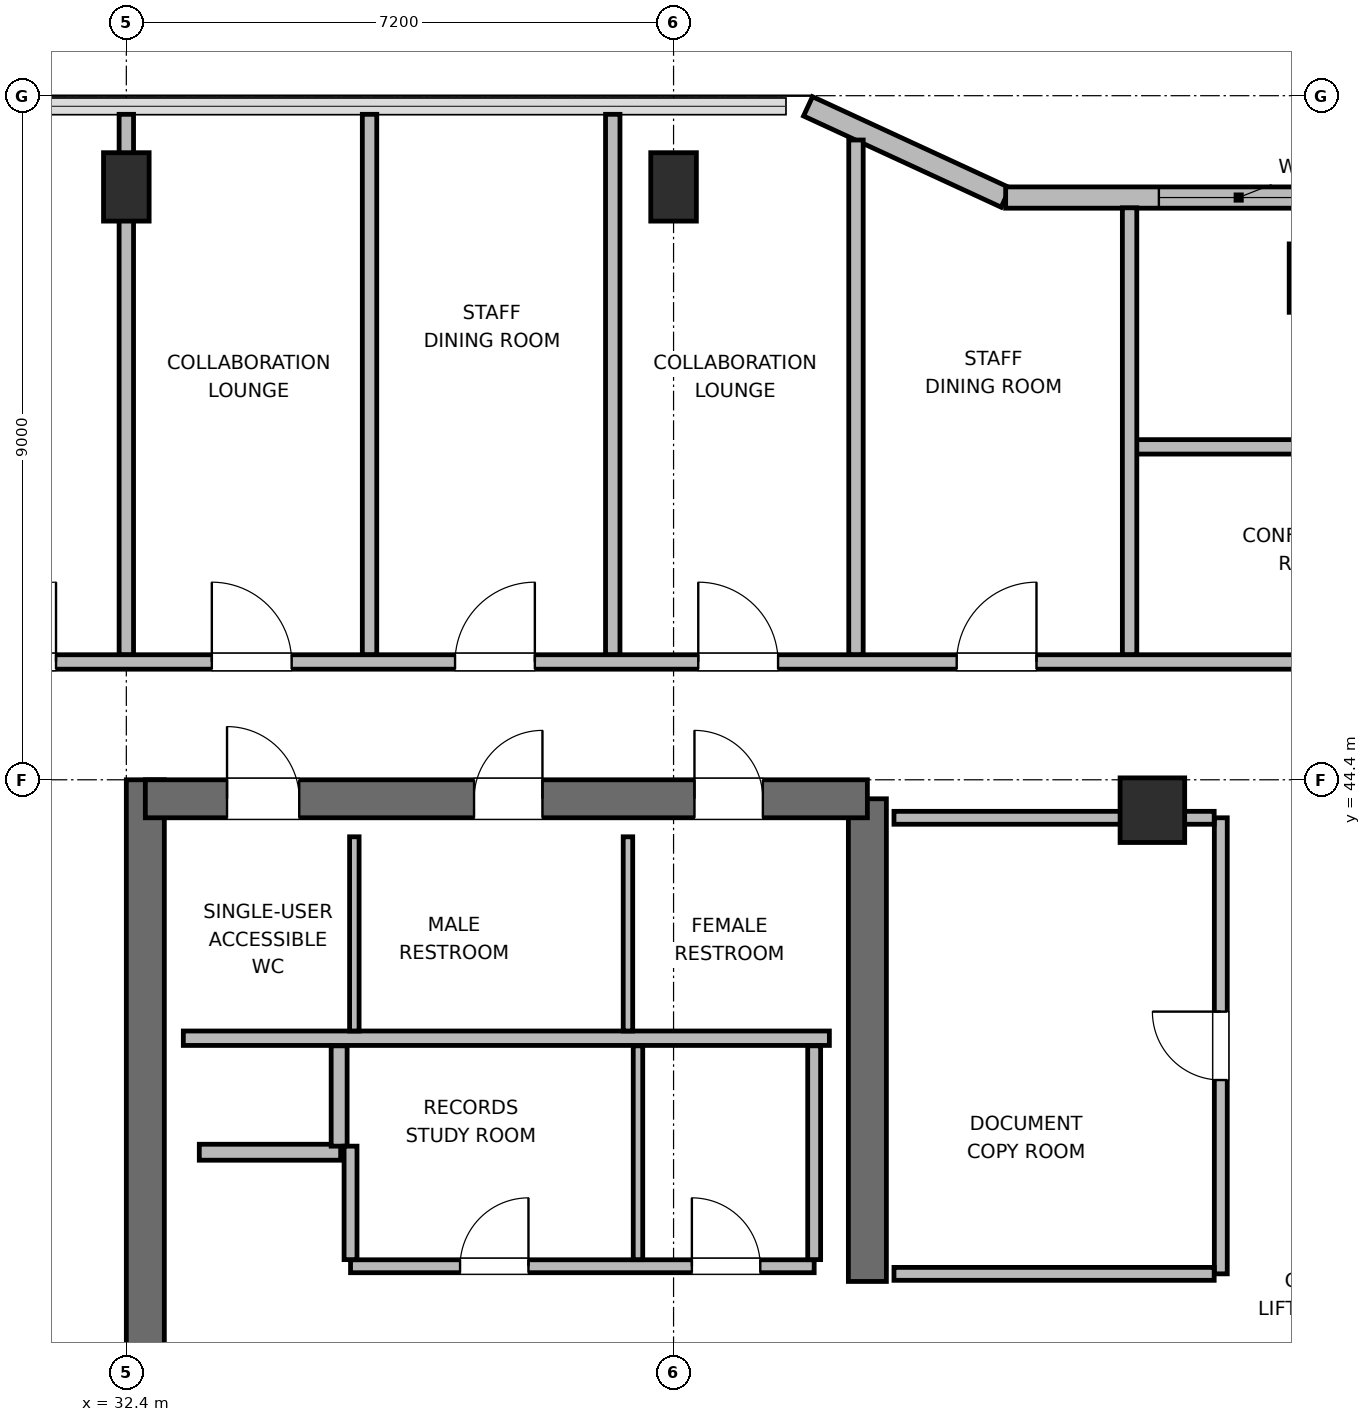
"""IFC4 building model, lengths in metres.
Left out: names, types, materials, properties, quantities, classifications, styles, units other than length and angle.
Written with IfcOpenShell. Run it as: python <this file> out.ifc"""

import sys

from ifc_helpers import new_model, si_unit, direction, frame, frame_2d, origin, origin_2d, place, context, subcontext, project, spatial, rectangle, extrude, element, fill, save


model = new_model("IFC4")
c1 = context("Model", 3, precision=1e-05, world=origin(), true_north=direction((0.0, 1.0)))
c2 = subcontext(c1, "Body", "Model", "MODEL_VIEW")
j1 = project(units=[si_unit("LENGTHUNIT", "METRE"), si_unit("PLANEANGLEUNIT", "RADIAN")], contexts=[c1])
p1 = place(None, origin())
s1 = spatial("IfcSite", under=j1, at=p1, CompositionType="ELEMENT")
p2 = place(p1, origin())
s2 = spatial("IfcBuilding", under=s1, at=p2, CompositionType="ELEMENT")
p3 = place(p2, frame((0.0, 0.0, 346.5)))
s3 = spatial("IfcBuildingStorey", under=s2, at=p3, CompositionType="ELEMENT", Elevation=346.5)
p4 = place(p3, frame((32.65, 27.6, 0.0), z_axis=(0.0, 0.0, 1.0), x_axis=(0.0, 1.0, 0.0)))
e1 = element("IfcWall", 1, at=p4, inside=s3, PredefinedType="SHEAR", context=c2, shape_type="SweptSolid", body=[
    extrude(rectangle(XDim=16.8, YDim=0.5, at=frame_2d((8.4, 0.0))), origin(), (0.0, 0.0, 1.0), 3.9),
])
p5 = place(p3, frame((42.15, 37.8, 0.0), z_axis=(0.0, 0.0, 1.0), x_axis=(0.0, 1.0, 0.0)))
e2 = element("IfcWall", 2, at=p5, inside=s3, PredefinedType="SHEAR", context=c2, shape_type="SweptSolid", body=[
    extrude(rectangle(XDim=6.35, YDim=0.5, at=frame_2d((3.175, 0.0))), origin(), (0.0, 0.0, 1.0), 3.9),
])
p6 = place(p3, frame((32.65, 44.15, 0.0), z_axis=(0.0, 0.0, 1.0), x_axis=(1.0, 0.0, 0.0)))
e3 = element("IfcWall", 3, at=p6, inside=s3, PredefinedType="SHEAR", context=c2, shape_type="SweptSolid", body=[
    extrude(rectangle(XDim=9.5, YDim=0.5, at=frame_2d((4.75, 0.0))), origin(), (0.0, 0.0, 1.0), 3.9),
])
p7 = place(p6, frame((1.075, 0.0, 0.0)))
e4 = element("IfcOpeningElement", 4, at=p7, cuts=e3, PredefinedType="OPENING", context=c2, shape_type="SweptSolid", body=[
    extrude(rectangle(XDim=0.95, YDim=2.04, at=frame_2d((0.475, 1.02))), frame((0.0, 0.26, 0.0), z_axis=(0.0, -1.0, 0.0), x_axis=(1.0, 0.0, 0.0)), (0.0, 0.0, 1.0), 0.52),
])
p8 = place(p6, frame((4.325, 0.0, 0.0)))
e5 = element("IfcOpeningElement", 5, at=p8, cuts=e3, PredefinedType="OPENING", context=c2, shape_type="SweptSolid", body=[
    extrude(rectangle(XDim=0.9, YDim=2.02, at=frame_2d((0.45, 1.01))), frame((0.0, 0.26, 0.0), z_axis=(0.0, -1.0, 0.0), x_axis=(1.0, 0.0, 0.0)), (0.0, 0.0, 1.0), 0.52),
])
p9 = place(p6, frame((7.225, 0.0, 0.0)))
e6 = element("IfcOpeningElement", 6, at=p9, cuts=e3, PredefinedType="OPENING", context=c2, shape_type="SweptSolid", body=[
    extrude(rectangle(XDim=0.9, YDim=2.02, at=frame_2d((0.45, 1.01))), frame((0.0, 0.26, 0.0), z_axis=(0.0, -1.0, 0.0), x_axis=(1.0, 0.0, 0.0)), (0.0, 0.0, 1.0), 0.52),
])
for number, where, z_axis, x_axis in (
    (7, (32.4, 52.2, 0.0), (0.0, 0.0, 1.0), (1.0, 0.0, 0.0)),
    (8, (39.6, 52.2, 0.0), (0.0, 0.0, 1.0), (1.0, 0.0, 0.0)),
    (9, (48.0, 51.0, 0.0), (0.0, 0.0, 1.0), (1.0, 0.0, 0.0)),
):
    element("IfcColumn", number, at=place(p3, frame(where, z_axis=z_axis, x_axis=x_axis)), inside=s3, PredefinedType="COLUMN", context=c2, shape_type="SweptSolid", body=[
        extrude(rectangle(XDim=0.6, YDim=0.9, at=origin_2d()), origin(), (0.0, 0.0, 1.0), 3.9),
    ])
p10 = place(p3, frame((45.9, 44.0, 0.0), z_axis=(0.0, 0.0, 1.0), x_axis=(1.0, 0.0, 0.0)))
e10 = element("IfcColumn", 10, at=p10, inside=s3, PredefinedType="COLUMN", context=c2, shape_type="SweptSolid", body=[
    extrude(rectangle(XDim=0.85, YDim=0.85, at=origin_2d()), origin(), (0.0, 0.0, 1.0), 3.9),
])
p11 = place(p3, frame((41.369, 53.26, 0.0), z_axis=(0.0, 0.0, 1.0), x_axis=(0.907956889006, -0.419063584324, 0.0)))
e11 = element("IfcWall", 11, at=p11, inside=s3, PredefinedType="SOLIDWALL", context=c2, shape_type="SweptSolid", body=[
    extrude(rectangle(XDim=2.864, YDim=0.28, at=frame_2d((1.432, 0.0))), origin(), (0.0, 0.0, 1.0), 2.215),
])
p12 = place(p3, frame((43.969, 52.06, 0.0), z_axis=(0.0, 0.0, 1.0), x_axis=(1.0, 0.0, 0.0)))
e12 = element("IfcWall", 12, at=p12, inside=s3, PredefinedType="SOLIDWALL", context=c2, shape_type="SweptSolid", body=[
    extrude(rectangle(XDim=4.691, YDim=0.28, at=frame_2d((2.345, 0.0))), origin(), (0.0, 0.0, 1.0), 2.215),
])
p13 = place(p12, frame((2.016, 0.0, 0.85)))
e13 = element("IfcOpeningElement", 13, at=p13, cuts=e12, PredefinedType="OPENING", context=c2, shape_type="SweptSolid", body=[
    extrude(rectangle(XDim=2.1, YDim=1.05, at=frame_2d((1.05, 0.525))), frame((0.0, 0.15, 0.0), z_axis=(0.0, -1.0, 0.0), x_axis=(1.0, 0.0, 0.0)), (0.0, 0.0, 1.0), 0.3),
])
p14 = place(p3, frame((33.15, 41.0, 0.0), z_axis=(0.0, 0.0, 1.0), x_axis=(1.0, 0.0, 0.0)))
e14 = element("IfcWall", 14, at=p14, inside=s3, PredefinedType="PLUMBINGWALL", context=c2, shape_type="SweptSolid", body=[
    extrude(rectangle(XDim=8.5, YDim=0.19, at=frame_2d((4.25, 0.0))), origin(), (0.0, 0.0, 1.0), 3.68),
])
for number, where, z_axis, x_axis in (
    (15, (35.4, 41.095, 0.0), (0.0, 0.0, 1.0), (0.0, 1.0, 0.0)),
    (16, (39.0, 41.095, 0.0), (0.0, 0.0, 1.0), (0.0, 1.0, 0.0)),
):
    element("IfcWall", number, at=place(p3, frame(where, z_axis=z_axis, x_axis=x_axis)), inside=s3, PredefinedType="PARTITIONING", context=c2, shape_type="SweptSolid", body=[
        extrude(rectangle(XDim=2.555, YDim=0.125, at=frame_2d((1.277, 0.0))), origin(), (0.0, 0.0, 1.0), 3.68),
    ])
p15 = place(p3, frame((33.36, 39.5, 0.0), z_axis=(0.0, 0.0, 1.0), x_axis=(1.0, 0.0, 0.0)))
e17 = element("IfcWall", 17, at=p15, inside=s3, PredefinedType="PARTITIONING", context=c2, shape_type="SweptSolid", body=[
    extrude(rectangle(XDim=1.86, YDim=0.21, at=frame_2d((0.93, 0.0))), origin(), (0.0, 0.0, 1.0), 3.68),
])
p16 = place(p3, frame((35.2, 39.58, 0.0), z_axis=(0.0, 0.0, 1.0), x_axis=(0.0, 1.0, 0.0)))
e18 = element("IfcWall", 18, at=p16, inside=s3, PredefinedType="PARTITIONING", context=c2, shape_type="SweptSolid", body=[
    extrude(rectangle(XDim=1.32, YDim=0.21, at=frame_2d((0.66, 0.0))), origin(), (0.0, 0.0, 1.0), 3.68),
])
p17 = place(p3, frame((35.35, 38.0, 0.0), z_axis=(0.0, 0.0, 1.0), x_axis=(1.0, 0.0, 0.0)))
e19 = element("IfcWall", 19, at=p17, inside=s3, PredefinedType="PARTITIONING", context=c2, shape_type="SweptSolid", body=[
    extrude(rectangle(XDim=6.1, YDim=0.17, at=frame_2d((3.05, 0.0))), origin(), (0.0, 0.0, 1.0), 3.68),
])
p18 = place(p17, frame((1.441, 0.0, 0.0)))
e20 = element("IfcOpeningElement", 20, at=p18, cuts=e19, PredefinedType="OPENING", context=c2, shape_type="SweptSolid", body=[
    extrude(rectangle(XDim=0.9, YDim=2.02, at=frame_2d((0.45, 1.01))), frame((0.0, 0.095, 0.0), z_axis=(0.0, -1.0, 0.0), x_axis=(1.0, 0.0, 0.0)), (0.0, 0.0, 1.0), 0.19),
])
p19 = place(p17, frame((4.491, 0.0, 0.0)))
e21 = element("IfcOpeningElement", 21, at=p19, cuts=e19, PredefinedType="OPENING", context=c2, shape_type="SweptSolid", body=[
    extrude(rectangle(XDim=0.9, YDim=2.02, at=frame_2d((0.45, 1.01))), frame((0.0, 0.095, 0.0), z_axis=(0.0, -1.0, 0.0), x_axis=(1.0, 0.0, 0.0)), (0.0, 0.0, 1.0), 0.19),
])
p20 = place(p3, frame((35.35, 38.087, 0.0), z_axis=(0.0, 0.0, 1.0), x_axis=(0.0, 1.0, 0.0)))
e22 = element("IfcWall", 22, at=p20, inside=s3, PredefinedType="PARTITIONING", context=c2, shape_type="SweptSolid", body=[
    extrude(rectangle(XDim=1.493, YDim=0.17, at=frame_2d((0.747, 0.0))), origin(), (0.0, 0.0, 1.0), 3.68),
])
p21 = place(p3, frame((41.45, 38.087, 0.0), z_axis=(0.0, 0.0, 1.0), x_axis=(0.0, 1.0, 0.0)))
e23 = element("IfcWall", 23, at=p21, inside=s3, PredefinedType="PARTITIONING", context=c2, shape_type="SweptSolid", body=[
    extrude(rectangle(XDim=2.813, YDim=0.17, at=frame_2d((1.406, 0.0))), origin(), (0.0, 0.0, 1.0), 3.68),
])
p22 = place(p3, frame((39.132, 38.087, 0.0), z_axis=(0.0, 0.0, 1.0), x_axis=(0.0, 1.0, 0.0)))
e24 = element("IfcWall", 24, at=p22, inside=s3, PredefinedType="PARTITIONING", context=c2, shape_type="SweptSolid", body=[
    extrude(rectangle(XDim=2.813, YDim=0.125, at=frame_2d((1.406, 0.0))), origin(), (0.0, 0.0, 1.0), 3.68),
])
p23 = place(p3, frame((46.8, 37.9, 0.0), z_axis=(0.0, 0.0, 1.0), x_axis=(0.0, 1.0, 0.0)))
e25 = element("IfcWall", 25, at=p23, inside=s3, PredefinedType="PARTITIONING", context=c2, shape_type="SweptSolid", body=[
    extrude(rectangle(XDim=6.0, YDim=0.17, at=frame_2d((3.0, 0.0))), origin(), (0.0, 0.0, 1.0), 3.68),
])
p24 = place(p23, frame((2.55, 0.0, 0.0)))
e26 = element("IfcOpeningElement", 26, at=p24, cuts=e25, PredefinedType="OPENING", context=c2, shape_type="SweptSolid", body=[
    extrude(rectangle(XDim=0.9, YDim=2.02, at=frame_2d((0.45, 1.01))), frame((0.0, 0.095, 0.0), z_axis=(0.0, -1.0, 0.0), x_axis=(1.0, 0.0, 0.0)), (0.0, 0.0, 1.0), 0.19),
])
p25 = place(p3, frame((42.5, 37.9, 0.0), z_axis=(0.0, 0.0, 1.0), x_axis=(1.0, 0.0, 0.0)))
e27 = element("IfcWall", 27, at=p25, inside=s3, PredefinedType="PARTITIONING", context=c2, shape_type="SweptSolid", body=[
    extrude(rectangle(XDim=4.213, YDim=0.17, at=frame_2d((2.106, 0.0))), origin(), (0.0, 0.0, 1.0), 3.68),
])
p26 = place(p3, frame((42.5, 43.9, 0.0), z_axis=(0.0, 0.0, 1.0), x_axis=(1.0, 0.0, 0.0)))
e28 = element("IfcWall", 28, at=p26, inside=s3, PredefinedType="PARTITIONING", context=c2, shape_type="SweptSolid", body=[
    extrude(rectangle(XDim=4.213, YDim=0.17, at=frame_2d((2.106, 0.0))), origin(), (0.0, 0.0, 1.0), 2.765),
])
p27 = place(p3, frame((29.4, 45.95, 0.0), z_axis=(0.0, 0.0, 1.0), x_axis=(1.0, 0.0, 0.0)))
e29 = element("IfcWall", 29, at=p27, inside=s3, PredefinedType="PLUMBINGWALL", context=c2, shape_type="SweptSolid", body=[
    extrude(rectangle(XDim=37.4, YDim=0.19, at=frame_2d((18.7, 0.0))), origin(), (0.0, 0.0, 1.0), 3.68),
])
p28 = place(p27, frame((1.025, 0.0, 0.0)))
e30 = element("IfcOpeningElement", 30, at=p28, cuts=e29, PredefinedType="OPENING", context=c2, shape_type="SweptSolid", body=[
    extrude(rectangle(XDim=1.05, YDim=2.04, at=frame_2d((0.525, 1.02))), frame((0.0, 0.105, 0.0), z_axis=(0.0, -1.0, 0.0), x_axis=(1.0, 0.0, 0.0)), (0.0, 0.0, 1.0), 0.21),
])
p29 = place(p27, frame((4.125, 0.0, 0.0)))
e31 = element("IfcOpeningElement", 31, at=p29, cuts=e29, PredefinedType="OPENING", context=c2, shape_type="SweptSolid", body=[
    extrude(rectangle(XDim=1.05, YDim=2.04, at=frame_2d((0.525, 1.02))), frame((0.0, 0.105, 0.0), z_axis=(0.0, -1.0, 0.0), x_axis=(1.0, 0.0, 0.0)), (0.0, 0.0, 1.0), 0.21),
])
p30 = place(p27, frame((7.325, 0.0, 0.0)))
e32 = element("IfcOpeningElement", 32, at=p30, cuts=e29, PredefinedType="OPENING", context=c2, shape_type="SweptSolid", body=[
    extrude(rectangle(XDim=1.05, YDim=2.04, at=frame_2d((0.525, 1.02))), frame((0.0, 0.105, 0.0), z_axis=(0.0, -1.0, 0.0), x_axis=(1.0, 0.0, 0.0)), (0.0, 0.0, 1.0), 0.21),
])
p31 = place(p27, frame((10.525, 0.0, 0.0)))
e33 = element("IfcOpeningElement", 33, at=p31, cuts=e29, PredefinedType="OPENING", context=c2, shape_type="SweptSolid", body=[
    extrude(rectangle(XDim=1.05, YDim=2.04, at=frame_2d((0.525, 1.02))), frame((0.0, 0.105, 0.0), z_axis=(0.0, -1.0, 0.0), x_axis=(1.0, 0.0, 0.0)), (0.0, 0.0, 1.0), 0.21),
])
p32 = place(p27, frame((13.925, 0.0, 0.0)))
e34 = element("IfcOpeningElement", 34, at=p32, cuts=e29, PredefinedType="OPENING", context=c2, shape_type="SweptSolid", body=[
    extrude(rectangle(XDim=1.05, YDim=2.04, at=frame_2d((0.525, 1.02))), frame((0.0, 0.105, 0.0), z_axis=(0.0, -1.0, 0.0), x_axis=(1.0, 0.0, 0.0)), (0.0, 0.0, 1.0), 0.21),
])
p33 = place(p27, frame((20.125, 0.0, 0.0)))
e35 = element("IfcOpeningElement", 35, at=p33, cuts=e29, PredefinedType="OPENING", context=c2, shape_type="SweptSolid", body=[
    extrude(rectangle(XDim=1.05, YDim=2.04, at=frame_2d((0.525, 1.02))), frame((0.0, 0.105, 0.0), z_axis=(0.0, -1.0, 0.0), x_axis=(1.0, 0.0, 0.0)), (0.0, 0.0, 1.0), 0.21),
])
p34 = place(p27, frame((26.125, 0.0, 0.0)))
e36 = element("IfcOpeningElement", 36, at=p34, cuts=e29, PredefinedType="OPENING", context=c2, shape_type="SweptSolid", body=[
    extrude(rectangle(XDim=1.05, YDim=2.04, at=frame_2d((0.525, 1.02))), frame((0.0, 0.105, 0.0), z_axis=(0.0, -1.0, 0.0), x_axis=(1.0, 0.0, 0.0)), (0.0, 0.0, 1.0), 0.21),
])
p35 = place(p27, frame((29.325, 0.0, 0.0)))
e37 = element("IfcOpeningElement", 37, at=p35, cuts=e29, PredefinedType="OPENING", context=c2, shape_type="SweptSolid", body=[
    extrude(rectangle(XDim=1.05, YDim=2.04, at=frame_2d((0.525, 1.02))), frame((0.0, 0.105, 0.0), z_axis=(0.0, -1.0, 0.0), x_axis=(1.0, 0.0, 0.0)), (0.0, 0.0, 1.0), 0.21),
])
p36 = place(p27, frame((33.925, 0.0, 0.0)))
e38 = element("IfcOpeningElement", 38, at=p36, cuts=e29, PredefinedType="OPENING", context=c2, shape_type="SweptSolid", body=[
    extrude(rectangle(XDim=1.05, YDim=2.04, at=frame_2d((0.525, 1.02))), frame((0.0, 0.105, 0.0), z_axis=(0.0, -1.0, 0.0), x_axis=(1.0, 0.0, 0.0)), (0.0, 0.0, 1.0), 0.21),
])
p37 = place(p3, frame((32.4, 46.047, 0.0), z_axis=(0.0, 0.0, 1.0), x_axis=(0.0, 1.0, 0.0)))
e39 = element("IfcWall", 39, at=p37, inside=s3, PredefinedType="PLUMBINGWALL", context=c2, shape_type="SweptSolid", body=[
    extrude(rectangle(XDim=7.108, YDim=0.19, at=frame_2d((3.554, 0.0))), origin(), (0.0, 0.0, 1.0), 3.054),
])
for number, where, z_axis, x_axis in (
    (40, (35.6, 46.047, 0.0), (0.0, 0.0, 1.0), (0.0, 1.0, 0.0)),
    (41, (38.8, 46.047, 0.0), (0.0, 0.0, 1.0), (0.0, 1.0, 0.0)),
):
    element("IfcWall", number, at=place(p3, frame(where, z_axis=z_axis, x_axis=x_axis)), inside=s3, PredefinedType="PLUMBINGWALL", context=c2, shape_type="SweptSolid", body=[
        extrude(rectangle(XDim=7.108, YDim=0.19, at=frame_2d((3.554, 0.0))), origin(), (0.0, 0.0, 1.0), 3.68),
    ])
p38 = place(p3, frame((42.0, 46.047, 0.0), z_axis=(0.0, 0.0, 1.0), x_axis=(0.0, 1.0, 0.0)))
e42 = element("IfcWall", 42, at=p38, inside=s3, PredefinedType="PLUMBINGWALL", context=c2, shape_type="SweptSolid", body=[
    extrude(rectangle(XDim=6.77, YDim=0.19, at=frame_2d((3.385, 0.0))), origin(), (0.0, 0.0, 1.0), 3.043),
])
p39 = place(p3, frame((45.6, 48.78, 0.0), z_axis=(0.0, 0.0, 1.0), x_axis=(1.0, 0.0, 0.0)))
e43 = element("IfcWall", 43, at=p39, inside=s3, PredefinedType="PLUMBINGWALL", context=c2, shape_type="SweptSolid", body=[
    extrude(rectangle(XDim=8.8, YDim=0.19, at=frame_2d((4.4, 0.0))), origin(), (0.0, 0.0, 1.0), 3.311),
])
p40 = place(p39, frame((3.95, 0.0, 0.0)))
e44 = element("IfcOpeningElement", 44, at=p40, cuts=e43, PredefinedType="OPENING", context=c2, shape_type="SweptSolid", body=[
    extrude(rectangle(XDim=0.9, YDim=2.02, at=frame_2d((0.45, 1.01))), frame((0.0, 0.105, 0.0), z_axis=(0.0, -1.0, 0.0), x_axis=(1.0, 0.0, 0.0)), (0.0, 0.0, 1.0), 0.21),
])
p41 = place(p3, frame((45.6, 46.047, 0.0), z_axis=(0.0, 0.0, 1.0), x_axis=(0.0, 1.0, 0.0)))
e45 = element("IfcWall", 45, at=p41, inside=s3, PredefinedType="PLUMBINGWALL", context=c2, shape_type="SweptSolid", body=[
    extrude(rectangle(XDim=5.878, YDim=0.19, at=frame_2d((2.939, 0.0))), origin(), (0.0, 0.0, 1.0), 3.68),
])
p42 = place(p13, origin())
e46 = element("IfcWindow", 46, at=p42, inside=s3, PartitioningType="SINGLE_PANEL", PredefinedType="WINDOW", context=c2, shape_type="SweptSolid", body=[
    extrude(rectangle(XDim=2.1, YDim=1.05, at=frame_2d((1.05, 0.525))), frame((0.0, 0.03, 0.0), z_axis=(0.0, -1.0, 0.0), x_axis=(1.0, 0.0, 0.0)), (0.0, 0.0, 1.0), 0.06),
])
fill(e13, e46)
p43 = place(p7, origin())
e47 = element("IfcDoor", 47, at=p43, inside=s3, OperationType="SINGLE_SWING_LEFT", PredefinedType="DOOR", context=c2, shape_type="SweptSolid", body=[
    extrude(rectangle(XDim=0.95, YDim=2.04, at=frame_2d((0.475, 1.02))), frame((0.0, 0.025, 0.0), z_axis=(0.0, -1.0, 0.0), x_axis=(1.0, 0.0, 0.0)), (0.0, 0.0, 1.0), 0.05),
])
fill(e4, e47)
p44 = place(p8, origin())
e48 = element("IfcDoor", 48, at=p44, inside=s3, OperationType="SINGLE_SWING_RIGHT", PredefinedType="DOOR", context=c2, shape_type="SweptSolid", body=[
    extrude(rectangle(XDim=0.9, YDim=2.02, at=frame_2d((0.45, 1.01))), frame((0.0, 0.025, 0.0), z_axis=(0.0, -1.0, 0.0), x_axis=(1.0, 0.0, 0.0)), (0.0, 0.0, 1.0), 0.05),
])
fill(e5, e48)
p45 = place(p9, origin())
e49 = element("IfcDoor", 49, at=p45, inside=s3, OperationType="SINGLE_SWING_LEFT", PredefinedType="DOOR", context=c2, shape_type="SweptSolid", body=[
    extrude(rectangle(XDim=0.9, YDim=2.02, at=frame_2d((0.45, 1.01))), frame((0.0, 0.025, 0.0), z_axis=(0.0, -1.0, 0.0), x_axis=(1.0, 0.0, 0.0)), (0.0, 0.0, 1.0), 0.05),
])
fill(e6, e49)
p46 = place(p18, origin())
e50 = element("IfcDoor", 50, at=p46, inside=s3, OperationType="SINGLE_SWING_RIGHT", PredefinedType="DOOR", context=c2, shape_type="SweptSolid", body=[
    extrude(rectangle(XDim=0.9, YDim=2.02, at=frame_2d((0.45, 1.01))), frame((0.0, 0.025, 0.0), z_axis=(0.0, -1.0, 0.0), x_axis=(1.0, 0.0, 0.0)), (0.0, 0.0, 1.0), 0.05),
])
fill(e20, e50)
p47 = place(p19, origin())
e51 = element("IfcDoor", 51, at=p47, inside=s3, OperationType="SINGLE_SWING_LEFT", PredefinedType="DOOR", context=c2, shape_type="SweptSolid", body=[
    extrude(rectangle(XDim=0.9, YDim=2.02, at=frame_2d((0.45, 1.01))), frame((0.0, 0.025, 0.0), z_axis=(0.0, -1.0, 0.0), x_axis=(1.0, 0.0, 0.0)), (0.0, 0.0, 1.0), 0.05),
])
fill(e21, e51)
p48 = place(p24, origin())
e52 = element("IfcDoor", 52, at=p48, inside=s3, OperationType="SINGLE_SWING_RIGHT", PredefinedType="DOOR", context=c2, shape_type="SweptSolid", body=[
    extrude(rectangle(XDim=0.9, YDim=2.02, at=frame_2d((0.45, 1.01))), frame((0.0, 0.025, 0.0), z_axis=(0.0, -1.0, 0.0), x_axis=(1.0, 0.0, 0.0)), (0.0, 0.0, 1.0), 0.05),
])
fill(e26, e52)
p49 = place(p28, origin())
e53 = element("IfcDoor", 53, at=p49, inside=s3, OperationType="SINGLE_SWING_RIGHT", PredefinedType="DOOR", context=c2, shape_type="SweptSolid", body=[
    extrude(rectangle(XDim=1.05, YDim=2.04, at=frame_2d((0.525, 1.02))), frame((0.0, 0.025, 0.0), z_axis=(0.0, -1.0, 0.0), x_axis=(1.0, 0.0, 0.0)), (0.0, 0.0, 1.0), 0.05),
])
fill(e30, e53)
p50 = place(p29, origin())
e54 = element("IfcDoor", 54, at=p50, inside=s3, OperationType="SINGLE_SWING_LEFT", PredefinedType="DOOR", context=c2, shape_type="SweptSolid", body=[
    extrude(rectangle(XDim=1.05, YDim=2.04, at=frame_2d((0.525, 1.02))), frame((0.0, 0.025, 0.0), z_axis=(0.0, -1.0, 0.0), x_axis=(1.0, 0.0, 0.0)), (0.0, 0.0, 1.0), 0.05),
])
fill(e31, e54)
p51 = place(p30, origin())
e55 = element("IfcDoor", 55, at=p51, inside=s3, OperationType="SINGLE_SWING_RIGHT", PredefinedType="DOOR", context=c2, shape_type="SweptSolid", body=[
    extrude(rectangle(XDim=1.05, YDim=2.04, at=frame_2d((0.525, 1.02))), frame((0.0, 0.025, 0.0), z_axis=(0.0, -1.0, 0.0), x_axis=(1.0, 0.0, 0.0)), (0.0, 0.0, 1.0), 0.05),
])
fill(e32, e55)
p52 = place(p31, origin())
e56 = element("IfcDoor", 56, at=p52, inside=s3, OperationType="SINGLE_SWING_LEFT", PredefinedType="DOOR", context=c2, shape_type="SweptSolid", body=[
    extrude(rectangle(XDim=1.05, YDim=2.04, at=frame_2d((0.525, 1.02))), frame((0.0, 0.025, 0.0), z_axis=(0.0, -1.0, 0.0), x_axis=(1.0, 0.0, 0.0)), (0.0, 0.0, 1.0), 0.05),
])
fill(e33, e56)
p53 = place(p32, origin())
e57 = element("IfcDoor", 57, at=p53, inside=s3, OperationType="SINGLE_SWING_RIGHT", PredefinedType="DOOR", context=c2, shape_type="SweptSolid", body=[
    extrude(rectangle(XDim=1.05, YDim=2.04, at=frame_2d((0.525, 1.02))), frame((0.0, 0.025, 0.0), z_axis=(0.0, -1.0, 0.0), x_axis=(1.0, 0.0, 0.0)), (0.0, 0.0, 1.0), 0.05),
])
fill(e34, e57)
save(model, sys.argv[1])
